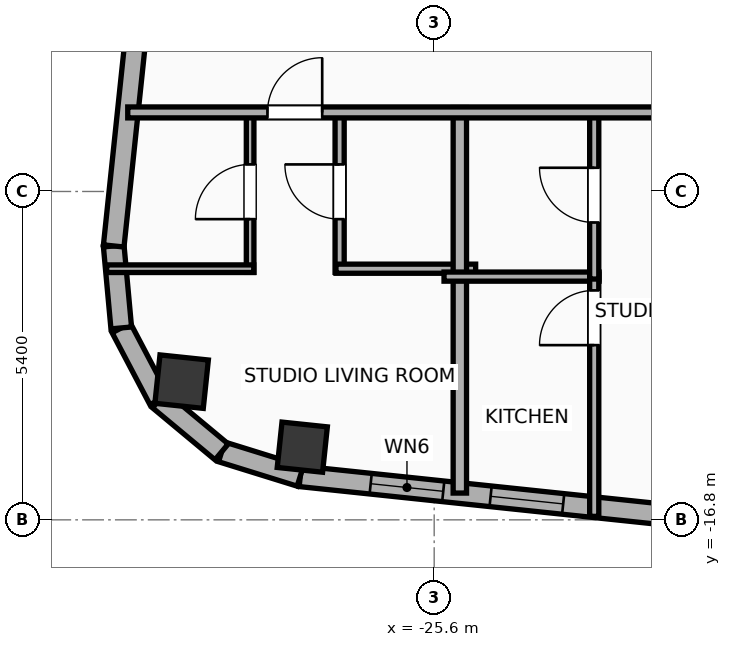
"""IFC4 building model, lengths in metres.
Left out: names, types, materials, properties, quantities, classifications, styles, units other than length and angle.
Written with IfcOpenShell. Run it as: python <this file> out.ifc"""

import sys

from ifc_helpers import new_model, si_unit, direction, frame, frame_2d, origin, origin_2d, place, context, subcontext, project, spatial, rectangle, hollow_rectangle, hollow_circle, extrude, element, fill, save


model = new_model("IFC4")
c1 = context("Model", 3, precision=1e-05, world=origin(), true_north=direction((0.0, 1.0)))
c2 = subcontext(c1, "Body", "Model", "MODEL_VIEW")
j1 = project(units=[si_unit("LENGTHUNIT", "METRE"), si_unit("PLANEANGLEUNIT", "RADIAN")], contexts=[c1])
p1 = place(None, origin())
s1 = spatial("IfcSite", under=j1, at=p1, CompositionType="ELEMENT")
p2 = place(p1, origin())
s2 = spatial("IfcBuilding", under=s1, at=p2, CompositionType="ELEMENT")
p3 = place(p2, frame((0.0, 0.0, 299.0)))
s3 = spatial("IfcBuildingStorey", under=s2, at=p3, CompositionType="ELEMENT", Elevation=299.0)
p4 = place(p3, frame((-27.769, -15.604, 0.0), z_axis=(0.0, 0.0, 1.0), x_axis=(0.994521895368, -0.104528463268, 0.0)))
e1 = element("IfcColumn", 1, at=p4, inside=s3, PredefinedType="COLUMN", context=c2, shape_type="SweptSolid", body=[
    extrude(hollow_rectangle(XDim=0.75, YDim=0.75, WallThickness=0.025, at=origin_2d()), origin(), (0.0, 0.0, 1.0), 3.9),
])
p5 = place(p3, frame((-29.753, -14.527, 0.0), z_axis=(0.0, 0.0, 1.0), x_axis=(0.994521895368, -0.104528463268, 0.0)))
e2 = element("IfcColumn", 2, at=p5, inside=s3, PredefinedType="COLUMN", context=c2, shape_type="SweptSolid", body=[
    extrude(hollow_circle(Radius=0.4, WallThickness=0.028, at=origin_2d()), origin(), (0.0, 0.0, 1.0), 3.9),
])
p6 = place(p3, frame((18.708, -20.972, 0.0), z_axis=(0.0, 0.0, 1.0), x_axis=(-0.994521888554, 0.104528528102, 0.0)))
e3 = element("IfcWall", 3, at=p6, inside=s3, PredefinedType="ELEMENTEDWALL", context=c2, shape_type="SweptSolid", body=[
    extrude(rectangle(XDim=46.766, YDim=0.34, at=frame_2d((23.383, 0.0))), origin(), (0.0, 0.0, 1.0), 3.635),
])
p7 = place(p6, frame((23.733, 0.0, 0.65)))
e4 = element("IfcOpeningElement", 4, at=p7, cuts=e3, PredefinedType="OPENING", context=c2, shape_type="SweptSolid", body=[
    extrude(rectangle(XDim=2.6, YDim=2.45, at=frame_2d((1.3, 1.225))), frame((0.0, 0.18, 0.0), z_axis=(0.0, -1.0, 0.0), x_axis=(1.0, 0.0, 0.0)), (0.0, 0.0, 1.0), 0.36),
])
p8 = place(p6, frame((44.402, 0.0, 0.75)))
e5 = element("IfcOpeningElement", 5, at=p8, cuts=e3, PredefinedType="OPENING", context=c2, shape_type="SweptSolid", body=[
    extrude(rectangle(XDim=1.2, YDim=2.05, at=frame_2d((0.6, 1.025))), frame((0.0, 0.18, 0.0), z_axis=(0.0, -1.0, 0.0), x_axis=(1.0, 0.0, 0.0)), (0.0, 0.0, 1.0), 0.36),
])
p9 = place(p6, frame((39.553, 0.0, 0.75)))
e6 = element("IfcOpeningElement", 6, at=p9, cuts=e3, PredefinedType="OPENING", context=c2, shape_type="SweptSolid", body=[
    extrude(rectangle(XDim=1.2, YDim=2.05, at=frame_2d((0.6, 1.025))), frame((0.0, 0.18, 0.0), z_axis=(0.0, -1.0, 0.0), x_axis=(1.0, 0.0, 0.0)), (0.0, 0.0, 1.0), 0.36),
])
p10 = place(p6, frame((42.419, 0.0, 0.75)))
e7 = element("IfcOpeningElement", 7, at=p10, cuts=e3, PredefinedType="OPENING", context=c2, shape_type="SweptSolid", body=[
    extrude(rectangle(XDim=1.2, YDim=2.05, at=frame_2d((0.6, 1.025))), frame((0.0, 0.18, 0.0), z_axis=(0.0, -1.0, 0.0), x_axis=(1.0, 0.0, 0.0)), (0.0, 0.0, 1.0), 0.36),
])
p11 = place(p6, frame((34.933, 0.0, 0.75)))
e8 = element("IfcOpeningElement", 8, at=p11, cuts=e3, PredefinedType="OPENING", context=c2, shape_type="SweptSolid", body=[
    extrude(rectangle(XDim=1.2, YDim=2.05, at=frame_2d((0.6, 1.025))), frame((0.0, 0.18, 0.0), z_axis=(0.0, -1.0, 0.0), x_axis=(1.0, 0.0, 0.0)), (0.0, 0.0, 1.0), 0.36),
])
p12 = place(p6, frame((28.692, 0.0, 0.75)))
e9 = element("IfcOpeningElement", 9, at=p12, cuts=e3, PredefinedType="OPENING", context=c2, shape_type="SweptSolid", body=[
    extrude(rectangle(XDim=1.2, YDim=2.05, at=frame_2d((0.6, 1.025))), frame((0.0, 0.18, 0.0), z_axis=(0.0, -1.0, 0.0), x_axis=(1.0, 0.0, 0.0)), (0.0, 0.0, 1.0), 0.36),
])
p13 = place(p6, frame((30.957, 0.0, 0.75)))
e10 = element("IfcOpeningElement", 10, at=p13, cuts=e3, PredefinedType="OPENING", context=c2, shape_type="SweptSolid", body=[
    extrude(rectangle(XDim=1.2, YDim=2.05, at=frame_2d((0.6, 1.025))), frame((0.0, 0.18, 0.0), z_axis=(0.0, -1.0, 0.0), x_axis=(1.0, 0.0, 0.0)), (0.0, 0.0, 1.0), 0.36),
])
p14 = place(p6, frame((7.492, 0.0, 0.75)))
e11 = element("IfcOpeningElement", 11, at=p14, cuts=e3, PredefinedType="OPENING", context=c2, shape_type="SweptSolid", body=[
    extrude(rectangle(XDim=1.2, YDim=2.05, at=frame_2d((0.6, 1.025))), frame((0.0, 0.18, 0.0), z_axis=(0.0, -1.0, 0.0), x_axis=(1.0, 0.0, 0.0)), (0.0, 0.0, 1.0), 0.36),
])
p15 = place(p6, frame((4.141, 0.0, 0.75)))
e12 = element("IfcOpeningElement", 12, at=p15, cuts=e3, PredefinedType="OPENING", context=c2, shape_type="SweptSolid", body=[
    extrude(rectangle(XDim=1.2, YDim=2.05, at=frame_2d((0.6, 1.025))), frame((0.0, 0.18, 0.0), z_axis=(0.0, -1.0, 0.0), x_axis=(1.0, 0.0, 0.0)), (0.0, 0.0, 1.0), 0.36),
])
p16 = place(p6, frame((1.36, 0.0, 0.75)))
e13 = element("IfcOpeningElement", 13, at=p16, cuts=e3, PredefinedType="OPENING", context=c2, shape_type="SweptSolid", body=[
    extrude(rectangle(XDim=1.2, YDim=2.05, at=frame_2d((0.6, 1.025))), frame((0.0, 0.18, 0.0), z_axis=(0.0, -1.0, 0.0), x_axis=(1.0, 0.0, 0.0)), (0.0, 0.0, 1.0), 0.36),
])
p17 = place(p6, frame((20.254, 0.0, 0.75)))
e14 = element("IfcOpeningElement", 14, at=p17, cuts=e3, PredefinedType="OPENING", context=c2, shape_type="SweptSolid", body=[
    extrude(rectangle(XDim=1.2, YDim=2.05, at=frame_2d((0.6, 1.025))), frame((0.0, 0.18, 0.0), z_axis=(0.0, -1.0, 0.0), x_axis=(1.0, 0.0, 0.0)), (0.0, 0.0, 1.0), 0.36),
])
p18 = place(p6, frame((16.172, 0.0, 0.75)))
e15 = element("IfcOpeningElement", 15, at=p18, cuts=e3, PredefinedType="OPENING", context=c2, shape_type="SweptSolid", body=[
    extrude(rectangle(XDim=1.2, YDim=2.05, at=frame_2d((0.6, 1.025))), frame((0.0, 0.18, 0.0), z_axis=(0.0, -1.0, 0.0), x_axis=(1.0, 0.0, 0.0)), (0.0, 0.0, 1.0), 0.36),
])
p19 = place(p6, frame((12.11, 0.0, 0.75)))
e16 = element("IfcOpeningElement", 16, at=p19, cuts=e3, PredefinedType="OPENING", context=c2, shape_type="SweptSolid", body=[
    extrude(rectangle(XDim=1.2, YDim=2.05, at=frame_2d((0.6, 1.025))), frame((0.0, 0.18, 0.0), z_axis=(0.0, -1.0, 0.0), x_axis=(1.0, 0.0, 0.0)), (0.0, 0.0, 1.0), 0.36),
])
p20 = place(p3, frame((-27.802, -16.084, 0.0), z_axis=(0.0, 0.0, 1.0), x_axis=(-0.955007802701, 0.296580674994, 0.0)))
e17 = element("IfcWall", 17, at=p20, inside=s3, PredefinedType="ELEMENTEDWALL", context=c2, shape_type="SweptSolid", body=[
    extrude(rectangle(XDim=1.354, YDim=0.34, at=frame_2d((0.677, 0.0))), origin(), (0.0, 0.0, 1.0), 3.635),
])
p21 = place(p3, frame((-29.096, -15.682, 0.0), z_axis=(0.0, 0.0, 1.0), x_axis=(-0.768864427906, 0.639411832469, 0.0)))
e18 = element("IfcWall", 18, at=p21, inside=s3, PredefinedType="ELEMENTEDWALL", context=c2, shape_type="SweptSolid", body=[
    extrude(rectangle(XDim=1.337, YDim=0.34, at=frame_2d((0.668, 0.0))), origin(), (0.0, 0.0, 1.0), 3.635),
])
p22 = place(p3, frame((-30.124, -14.827, 0.0), z_axis=(0.0, 0.0, 1.0), x_axis=(-0.465528132217, 0.885033083062, 0.0)))
e19 = element("IfcWall", 19, at=p22, inside=s3, PredefinedType="ELEMENTEDWALL", context=c2, shape_type="SweptSolid", body=[
    extrude(rectangle(XDim=1.337, YDim=0.34, at=frame_2d((0.668, 0.0))), origin(), (0.0, 0.0, 1.0), 3.635),
])
p23 = place(p3, frame((-30.746, -13.644, 0.0), z_axis=(0.0, 0.0, 1.0), x_axis=(-0.091592370975, 0.995796584438, 0.0)))
e20 = element("IfcWall", 20, at=p23, inside=s3, PredefinedType="ELEMENTEDWALL", context=c2, shape_type="SweptSolid", body=[
    extrude(rectangle(XDim=1.354, YDim=0.34, at=frame_2d((0.677, 0.0))), origin(), (0.0, 0.0, 1.0), 3.635),
])
p24 = place(p3, frame((-30.87, -12.296, 0.0), z_axis=(0.0, 0.0, 1.0), x_axis=(0.104533282919, 0.994521388791, 0.0)))
e21 = element("IfcWall", 21, at=p24, inside=s3, PredefinedType="ELEMENTEDWALL", context=c2, shape_type="SweptSolid", body=[
    extrude(rectangle(XDim=30.366, YDim=0.34, at=frame_2d((15.183, 0.0))), origin(), (0.0, 0.0, 1.0), 3.635),
])
p25 = place(p24, frame((5.442, 0.0, 0.65)))
e22 = element("IfcOpeningElement", 22, at=p25, cuts=e21, PredefinedType="OPENING", context=c2, shape_type="SweptSolid", body=[
    extrude(rectangle(XDim=2.6, YDim=2.45, at=frame_2d((1.3, 1.225))), frame((0.0, 0.18, 0.0), z_axis=(0.0, -1.0, 0.0), x_axis=(1.0, 0.0, 0.0)), (0.0, 0.0, 1.0), 0.36),
])
p26 = place(p24, frame((27.017, 0.0, 0.75)))
e23 = element("IfcOpeningElement", 23, at=p26, cuts=e21, PredefinedType="OPENING", context=c2, shape_type="SweptSolid", body=[
    extrude(rectangle(XDim=1.2, YDim=2.05, at=frame_2d((0.6, 1.025))), frame((0.0, 0.18, 0.0), z_axis=(0.0, -1.0, 0.0), x_axis=(1.0, 0.0, 0.0)), (0.0, 0.0, 1.0), 0.36),
])
p27 = place(p24, frame((16.135, 0.0, 0.75)))
e24 = element("IfcOpeningElement", 24, at=p27, cuts=e21, PredefinedType="OPENING", context=c2, shape_type="SweptSolid", body=[
    extrude(rectangle(XDim=1.2, YDim=2.05, at=frame_2d((0.6, 1.025))), frame((0.0, 0.18, 0.0), z_axis=(0.0, -1.0, 0.0), x_axis=(1.0, 0.0, 0.0)), (0.0, 0.0, 1.0), 0.36),
])
p28 = place(p3, frame((-28.627, -12.73, 0.0), z_axis=(0.0, 0.0, 1.0), x_axis=(0.0, 1.0, 0.0)))
e25 = element("IfcWall", 25, at=p28, inside=s3, PredefinedType="PARTITIONING", context=c2, shape_type="SweptSolid", body=[
    extrude(rectangle(XDim=2.65, YDim=0.125, at=frame_2d((1.325, 0.0))), origin(), (0.0, 0.0, 1.0), 3.635),
])
p29 = place(p28, frame((0.875, 0.0, 0.0)))
e26 = element("IfcOpeningElement", 26, at=p29, cuts=e25, PredefinedType="OPENING", context=c2, shape_type="SweptSolid", body=[
    extrude(rectangle(XDim=0.9, YDim=2.05, at=frame_2d((0.45, 1.025))), frame((0.0, 0.073, 0.0), z_axis=(0.0, -1.0, 0.0), x_axis=(1.0, 0.0, 0.0)), (0.0, 0.0, 1.0), 0.145),
])
p30 = place(p3, frame((-27.155, -12.73, 0.0), z_axis=(0.0, 0.0, 1.0), x_axis=(0.0, 1.0, 0.0)))
e27 = element("IfcWall", 27, at=p30, inside=s3, PredefinedType="PLUMBINGWALL", context=c2, shape_type="SweptSolid", body=[
    extrude(rectangle(XDim=2.65, YDim=0.15, at=frame_2d((1.325, 0.0))), origin(), (0.0, 0.0, 1.0), 3.635),
])
p31 = place(p30, frame((0.875, 0.0, 0.0)))
e28 = element("IfcOpeningElement", 28, at=p31, cuts=e27, PredefinedType="OPENING", context=c2, shape_type="SweptSolid", body=[
    extrude(rectangle(XDim=0.9, YDim=2.05, at=frame_2d((0.45, 1.025))), frame((0.0, 0.085, 0.0), z_axis=(0.0, -1.0, 0.0), x_axis=(1.0, 0.0, 0.0)), (0.0, 0.0, 1.0), 0.17),
])
p32 = place(p3, frame((-30.986, -12.67, 0.0), z_axis=(0.0, 0.0, 1.0), x_axis=(1.0, 0.0, 0.0)))
e29 = element("IfcWall", 29, at=p32, inside=s3, PredefinedType="PARTITIONING", context=c2, shape_type="SweptSolid", body=[
    extrude(rectangle(XDim=2.419, YDim=0.125, at=frame_2d((1.21, 0.0))), origin(), (0.0, 0.0, 1.0), 3.635),
])
p33 = place(p3, frame((-27.215, -12.67, 0.0), z_axis=(0.0, 0.0, 1.0), x_axis=(1.0, 0.0, 0.0)))
e30 = element("IfcWall", 30, at=p33, inside=s3, PredefinedType="PLUMBINGWALL", context=c2, shape_type="SweptSolid", body=[
    extrude(rectangle(XDim=2.297, YDim=0.15, at=frame_2d((1.148, 0.0))), origin(), (0.0, 0.0, 1.0), 3.635),
])
p34 = place(p3, frame((-25.178, -16.36, 0.0), z_axis=(0.0, 0.0, 1.0), x_axis=(0.0, 1.0, 0.0)))
e31 = element("IfcWall", 31, at=p34, inside=s3, PredefinedType="PARTITIONING", context=c2, shape_type="SweptSolid", body=[
    extrude(rectangle(XDim=6.34, YDim=0.22, at=frame_2d((3.17, 0.0))), origin(), (0.0, 0.0, 1.0), 3.635),
])
p35 = place(p3, frame((-25.438, -12.8, 0.0), z_axis=(0.0, 0.0, 1.0), x_axis=(1.0, 0.0, 0.0)))
e32 = element("IfcWall", 32, at=p35, inside=s3, PredefinedType="PLUMBINGWALL", context=c2, shape_type="SweptSolid", body=[
    extrude(rectangle(XDim=2.55, YDim=0.15, at=frame_2d((1.275, 0.0))), origin(), (0.0, 0.0, 1.0), 3.635),
])
p36 = place(p3, frame((-22.968, -16.743, 0.0), z_axis=(0.0, 0.0, 1.0), x_axis=(0.0, 1.0, 0.0)))
e33 = element("IfcWall", 33, at=p36, inside=s3, PredefinedType="PLUMBINGWALL", context=c2, shape_type="SweptSolid", body=[
    extrude(rectangle(XDim=3.983, YDim=0.15, at=frame_2d((1.991, 0.0))), origin(), (0.0, 0.0, 1.0), 3.635),
])
p37 = place(p36, frame((2.816, 0.0, 0.0)))
e34 = element("IfcOpeningElement", 34, at=p37, cuts=e33, PredefinedType="OPENING", context=c2, shape_type="SweptSolid", body=[
    extrude(rectangle(XDim=0.9, YDim=2.05, at=frame_2d((0.45, 1.025))), frame((0.0, 0.085, 0.0), z_axis=(0.0, -1.0, 0.0), x_axis=(1.0, 0.0, 0.0)), (0.0, 0.0, 1.0), 0.17),
])
p38 = place(p3, frame((-22.968, -12.84, 0.0), z_axis=(0.0, 0.0, 1.0), x_axis=(0.0, 1.0, 0.0)))
e35 = element("IfcWall", 35, at=p38, inside=s3, PredefinedType="PLUMBINGWALL", context=c2, shape_type="SweptSolid", body=[
    extrude(rectangle(XDim=2.76, YDim=0.15, at=frame_2d((1.38, 0.0))), origin(), (0.0, 0.0, 1.0), 3.635),
])
p39 = place(p38, frame((0.93, 0.0, 0.0)))
e36 = element("IfcOpeningElement", 36, at=p39, cuts=e35, PredefinedType="OPENING", context=c2, shape_type="SweptSolid", body=[
    extrude(rectangle(XDim=0.9, YDim=2.05, at=frame_2d((0.45, 1.025))), frame((0.0, 0.085, 0.0), z_axis=(0.0, -1.0, 0.0), x_axis=(1.0, 0.0, 0.0)), (0.0, 0.0, 1.0), 0.17),
])
p40 = place(p3, frame((-30.639, -10.1, 0.0), z_axis=(0.0, 0.0, 1.0), x_axis=(1.0, 0.0, 0.0)))
e37 = element("IfcWall", 37, at=p40, inside=s3, PredefinedType="PARTITIONING", context=c2, shape_type="SweptSolid", body=[
    extrude(rectangle(XDim=22.559, YDim=0.18, at=frame_2d((11.28, 0.0))), origin(), (0.0, 0.0, 1.0), 3.635),
])
p41 = place(p40, frame((2.298, 0.0, 0.0)))
e38 = element("IfcOpeningElement", 38, at=p41, cuts=e37, PredefinedType="OPENING", context=c2, shape_type="SweptSolid", body=[
    extrude(rectangle(XDim=0.9, YDim=2.05, at=frame_2d((0.45, 1.025))), frame((0.0, 0.1, 0.0), z_axis=(0.0, -1.0, 0.0), x_axis=(1.0, 0.0, 0.0)), (0.0, 0.0, 1.0), 0.2),
])
p42 = place(p40, frame((8.812, 0.0, 0.0)))
e39 = element("IfcOpeningElement", 39, at=p42, cuts=e37, PredefinedType="OPENING", context=c2, shape_type="SweptSolid", body=[
    extrude(rectangle(XDim=1.15, YDim=2.05, at=frame_2d((0.575, 1.025))), frame((0.0, 0.1, 0.0), z_axis=(0.0, -1.0, 0.0), x_axis=(1.0, 0.0, 0.0)), (0.0, 0.0, 1.0), 0.2),
])
p43 = place(p40, frame((13.738, 0.0, 0.0)))
e40 = element("IfcOpeningElement", 40, at=p43, cuts=e37, PredefinedType="OPENING", context=c2, shape_type="SweptSolid", body=[
    extrude(rectangle(XDim=0.9, YDim=2.05, at=frame_2d((0.45, 1.025))), frame((0.0, 0.1, 0.0), z_axis=(0.0, -1.0, 0.0), x_axis=(1.0, 0.0, 0.0)), (0.0, 0.0, 1.0), 0.2),
])
p44 = place(p40, frame((20.209, 0.0, 0.0)))
e41 = element("IfcOpeningElement", 41, at=p44, cuts=e37, PredefinedType="OPENING", context=c2, shape_type="SweptSolid", body=[
    extrude(rectangle(XDim=1.15, YDim=2.05, at=frame_2d((0.575, 1.025))), frame((0.0, 0.1, 0.0), z_axis=(0.0, -1.0, 0.0), x_axis=(1.0, 0.0, 0.0)), (0.0, 0.0, 1.0), 0.2),
])
p45 = place(p8, origin())
e42 = element("IfcWindow", 42, at=p45, inside=s3, PartitioningType="SINGLE_PANEL", PredefinedType="WINDOW", context=c2, shape_type="SweptSolid", body=[
    extrude(rectangle(XDim=1.2, YDim=2.05, at=frame_2d((0.6, 1.025))), frame((0.0, 0.03, 0.0), z_axis=(0.0, -1.0, 0.0), x_axis=(1.0, 0.0, 0.0)), (0.0, 0.0, 1.0), 0.06),
])
fill(e5, e42)
p46 = place(p10, origin())
e43 = element("IfcWindow", 43, at=p46, inside=s3, PartitioningType="SINGLE_PANEL", PredefinedType="WINDOW", context=c2, shape_type="SweptSolid", body=[
    extrude(rectangle(XDim=1.2, YDim=2.05, at=frame_2d((0.6, 1.025))), frame((0.0, 0.03, 0.0), z_axis=(0.0, -1.0, 0.0), x_axis=(1.0, 0.0, 0.0)), (0.0, 0.0, 1.0), 0.06),
])
fill(e7, e43)
p47 = place(p29, origin())
e44 = element("IfcDoor", 44, at=p47, inside=s3, OperationType="SINGLE_SWING_LEFT", PredefinedType="DOOR", context=c2, shape_type="SweptSolid", body=[
    extrude(rectangle(XDim=0.9, YDim=2.05, at=frame_2d((0.45, 1.025))), frame((0.0, 0.025, 0.0), z_axis=(0.0, -1.0, 0.0), x_axis=(1.0, 0.0, 0.0)), (0.0, 0.0, 1.0), 0.05),
])
fill(e26, e44)
p48 = place(p31, origin())
e45 = element("IfcDoor", 45, at=p48, inside=s3, OperationType="SINGLE_SWING_RIGHT", PredefinedType="DOOR", context=c2, shape_type="SweptSolid", body=[
    extrude(rectangle(XDim=0.9, YDim=2.05, at=frame_2d((0.45, 1.025))), frame((0.0, 0.025, 0.0), z_axis=(0.0, -1.0, 0.0), x_axis=(1.0, 0.0, 0.0)), (0.0, 0.0, 1.0), 0.05),
])
fill(e28, e45)
p49 = place(p37, origin())
e46 = element("IfcDoor", 46, at=p49, inside=s3, OperationType="SINGLE_SWING_LEFT", PredefinedType="DOOR", context=c2, shape_type="SweptSolid", body=[
    extrude(rectangle(XDim=0.9, YDim=2.05, at=frame_2d((0.45, 1.025))), frame((0.0, 0.025, 0.0), z_axis=(0.0, -1.0, 0.0), x_axis=(1.0, 0.0, 0.0)), (0.0, 0.0, 1.0), 0.05),
])
fill(e34, e46)
p50 = place(p39, origin())
e47 = element("IfcDoor", 47, at=p50, inside=s3, OperationType="SINGLE_SWING_RIGHT", PredefinedType="DOOR", context=c2, shape_type="SweptSolid", body=[
    extrude(rectangle(XDim=0.9, YDim=2.05, at=frame_2d((0.45, 1.025))), frame((0.0, 0.025, 0.0), z_axis=(0.0, -1.0, 0.0), x_axis=(1.0, 0.0, 0.0)), (0.0, 0.0, 1.0), 0.05),
])
fill(e36, e47)
p51 = place(p41, origin())
e48 = element("IfcDoor", 48, at=p51, inside=s3, OperationType="SINGLE_SWING_RIGHT", PredefinedType="DOOR", context=c2, shape_type="SweptSolid", body=[
    extrude(rectangle(XDim=0.9, YDim=2.05, at=frame_2d((0.45, 1.025))), frame((0.0, 0.025, 0.0), z_axis=(0.0, -1.0, 0.0), x_axis=(1.0, 0.0, 0.0)), (0.0, 0.0, 1.0), 0.05),
])
fill(e38, e48)
save(model, sys.argv[1])
